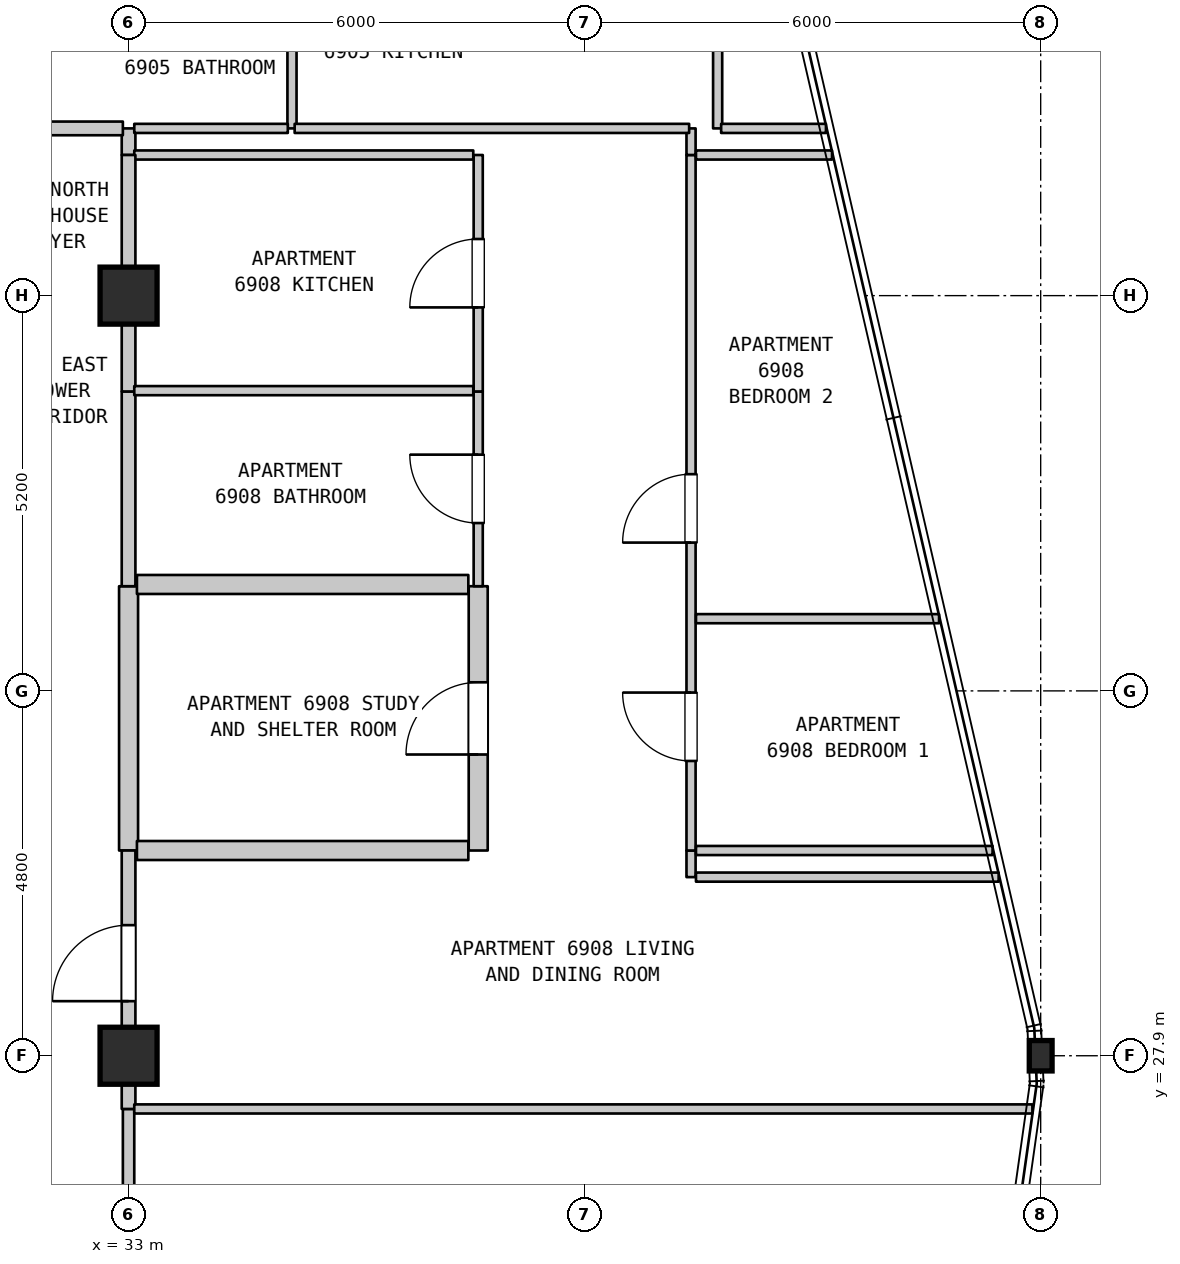
"""IFC4 building model, lengths in metres.
Left out: names, types, materials, properties, quantities, classifications, styles, units other than length and angle.
Written with IfcOpenShell. Run it as: python <this file> out.ifc"""

import sys

from ifc_helpers import new_model, si_unit, direction, frame, frame_2d, origin, origin_2d, place, context, subcontext, project, spatial, rectangle, i_section, extrude, element, fill, save


model = new_model("IFC4")
c1 = context("Model", 3, precision=1e-05, world=origin(), true_north=direction((0.0, 1.0)))
c2 = subcontext(c1, "Body", "Model", "MODEL_VIEW")
j1 = project(units=[si_unit("LENGTHUNIT", "METRE"), si_unit("PLANEANGLEUNIT", "RADIAN")], contexts=[c1])
p1 = place(None, origin())
s1 = spatial("IfcSite", under=j1, at=p1, CompositionType="ELEMENT")
p2 = place(p1, origin())
s2 = spatial("IfcBuilding", under=s1, at=p2, CompositionType="ELEMENT")
p3 = place(p2, frame((0.0, 0.0, 276.9)))
s3 = spatial("IfcBuildingStorey", under=s2, at=p3, CompositionType="ELEMENT", Elevation=276.9)
for number, where, z_axis, x_axis in (
    (1, (33.0, 27.9, 0.0), (0.0, 0.0, 1.0), (1.0, 0.0, 0.0)),
    (2, (33.0, 37.9, 0.0), (0.0, 0.0, 1.0), (1.0, 0.0, 0.0)),
):
    element("IfcColumn", number, at=place(p3, frame(where, z_axis=z_axis, x_axis=x_axis)), inside=s3, PredefinedType="COLUMN", context=c2, shape_type="SweptSolid", body=[
        extrude(rectangle(XDim=0.75, YDim=0.75, at=origin_2d()), origin(), (0.0, 0.0, 1.0), 3.7),
    ])
p4 = place(p3, frame((45.0, 27.9, 0.0), z_axis=(0.0, 0.0, 1.0), x_axis=(1.0, 0.0, 0.0)))
e3 = element("IfcColumn", 3, at=p4, inside=s3, PredefinedType="COLUMN", context=c2, shape_type="SweptSolid", body=[
    extrude(i_section(OverallWidth=0.3, OverallDepth=0.4, WebThickness=0.013, FlangeThickness=0.024, FilletRadius=0.027, at=origin_2d()), origin(), (0.0, 0.0, 1.0), 3.7),
])
p5 = place(p3, frame((33.0, 19.5, 0.0), z_axis=(0.0, 0.0, 1.0), x_axis=(0.0, 1.0, 0.0)))
e4 = element("IfcWall", 4, at=p5, inside=s3, PredefinedType="STANDARD", context=c2, shape_type="SweptSolid", body=[
    extrude(rectangle(XDim=7.7, YDim=0.15, at=frame_2d((3.85, 0.0))), origin(), (0.0, 0.0, 1.0), 3.1),
])
p6 = place(p5, frame((3.913, 0.0, 0.0)))
e5 = element("IfcOpeningElement", 5, at=p6, cuts=e4, PredefinedType="OPENING", context=c2, shape_type="SweptSolid", body=[
    extrude(rectangle(XDim=1.0, YDim=2.15, at=frame_2d((0.5, 1.075))), frame((0.0, 0.085, 0.0), z_axis=(0.0, -1.0, 0.0), x_axis=(1.0, 0.0, 0.0)), (0.0, 0.0, 1.0), 0.17),
])
p7 = place(p3, frame((33.0, 27.2, 0.0), z_axis=(0.0, 0.0, 1.0), x_axis=(0.0, 1.0, 0.0)))
e6 = element("IfcWall", 6, at=p7, inside=s3, PredefinedType="STANDARD", context=c2, shape_type="SweptSolid", body=[
    extrude(rectangle(XDim=0.7, YDim=0.18, at=frame_2d((0.35, 0.0))), origin(), (0.0, 0.0, 1.0), 3.1),
])
p8 = place(p3, frame((33.0, 30.6, 0.0), z_axis=(0.0, 0.0, 1.0), x_axis=(0.0, 1.0, 0.0)))
e7 = element("IfcWall", 7, at=p8, inside=s3, PredefinedType="STANDARD", context=c2, shape_type="SweptSolid", body=[
    extrude(rectangle(XDim=3.477, YDim=0.25, at=frame_2d((1.738, 0.0))), origin(), (0.0, 0.0, 1.0), 2.89),
])
p9 = place(p3, frame((33.0, 34.077, 0.0), z_axis=(0.0, 0.0, 1.0), x_axis=(0.0, 1.0, 0.0)))
e8 = element("IfcWall", 8, at=p9, inside=s3, PredefinedType="STANDARD", context=c2, shape_type="SweptSolid", body=[
    extrude(rectangle(XDim=2.562, YDim=0.18, at=frame_2d((1.281, 0.0))), origin(), (0.0, 0.0, 1.0), 2.89),
])
p10 = place(p3, frame((33.0, 36.639, 0.0), z_axis=(0.0, 0.0, 1.0), x_axis=(0.0, 1.0, 0.0)))
e9 = element("IfcWall", 9, at=p10, inside=s3, PredefinedType="STANDARD", context=c2, shape_type="SweptSolid", body=[
    extrude(rectangle(XDim=1.261, YDim=0.18, at=frame_2d((0.63, 0.0))), origin(), (0.0, 0.0, 1.0), 2.89),
])
p11 = place(p3, frame((33.0, 39.75, 0.0), z_axis=(0.0, 0.0, 1.0), x_axis=(0.0, 1.0, 0.0)))
e10 = element("IfcWall", 10, at=p11, inside=s3, PredefinedType="STANDARD", context=c2, shape_type="SweptSolid", body=[
    extrude(rectangle(XDim=0.35, YDim=0.18, at=frame_2d((0.175, 0.0))), origin(), (0.0, 0.0, 1.0), 3.39),
])
p12 = place(p3, frame((35.15, 40.1, 0.0), z_axis=(0.0, 0.0, 1.0), x_axis=(0.0, 1.0, 0.0)))
e11 = element("IfcWall", 11, at=p12, inside=s3, PredefinedType="PARTITIONING", context=c2, shape_type="SweptSolid", body=[
    extrude(rectangle(XDim=2.3, YDim=0.12, at=frame_2d((1.15, 0.0))), origin(), (0.0, 0.0, 1.0), 3.39),
])
p13 = place(p3, frame((37.6, 30.6, 0.0), z_axis=(0.0, 0.0, 1.0), x_axis=(0.0, 1.0, 0.0)))
e12 = element("IfcWall", 12, at=p13, inside=s3, PredefinedType="STANDARD", context=c2, shape_type="SweptSolid", body=[
    extrude(rectangle(XDim=3.477, YDim=0.25, at=frame_2d((1.738, 0.0))), origin(), (0.0, 0.0, 1.0), 3.39),
])
p14 = place(p13, frame((1.263, 0.0, 0.0)))
e13 = element("IfcOpeningElement", 13, at=p14, cuts=e12, PredefinedType="OPENING", context=c2, shape_type="SweptSolid", body=[
    extrude(rectangle(XDim=0.95, YDim=2.15, at=frame_2d((0.475, 1.075))), frame((0.0, 0.135, 0.0), z_axis=(0.0, -1.0, 0.0), x_axis=(1.0, 0.0, 0.0)), (0.0, 0.0, 1.0), 0.27),
])
p15 = place(p3, frame((37.6, 34.077, 0.0), z_axis=(0.0, 0.0, 1.0), x_axis=(0.0, 1.0, 0.0)))
e14 = element("IfcWall", 14, at=p15, inside=s3, PredefinedType="PARTITIONING", context=c2, shape_type="SweptSolid", body=[
    extrude(rectangle(XDim=2.562, YDim=0.12, at=frame_2d((1.281, 0.0))), origin(), (0.0, 0.0, 1.0), 3.39),
])
p16 = place(p15, frame((0.831, 0.0, 0.0)))
e15 = element("IfcOpeningElement", 15, at=p16, cuts=e14, PredefinedType="OPENING", context=c2, shape_type="SweptSolid", body=[
    extrude(rectangle(XDim=0.9, YDim=2.1, at=frame_2d((0.45, 1.05))), frame((0.0, 0.07, 0.0), z_axis=(0.0, -1.0, 0.0), x_axis=(1.0, 0.0, 0.0)), (0.0, 0.0, 1.0), 0.14),
])
p17 = place(p3, frame((37.6, 36.639, 0.0), z_axis=(0.0, 0.0, 1.0), x_axis=(0.0, 1.0, 0.0)))
e16 = element("IfcWall", 16, at=p17, inside=s3, PredefinedType="PARTITIONING", context=c2, shape_type="SweptSolid", body=[
    extrude(rectangle(XDim=3.111, YDim=0.12, at=frame_2d((1.556, 0.0))), origin(), (0.0, 0.0, 1.0), 3.39),
])
p18 = place(p17, frame((1.106, 0.0, 0.0)))
e17 = element("IfcOpeningElement", 17, at=p18, cuts=e16, PredefinedType="OPENING", context=c2, shape_type="SweptSolid", body=[
    extrude(rectangle(XDim=0.9, YDim=2.15, at=frame_2d((0.45, 1.075))), frame((0.0, 0.07, 0.0), z_axis=(0.0, -1.0, 0.0), x_axis=(1.0, 0.0, 0.0)), (0.0, 0.0, 1.0), 0.14),
])
p19 = place(p3, frame((40.4, 30.25, 0.0), z_axis=(0.0, 0.0, 1.0), x_axis=(0.0, 1.0, 0.0)))
e18 = element("IfcWall", 18, at=p19, inside=s3, PredefinedType="PARTITIONING", context=c2, shape_type="SweptSolid", body=[
    extrude(rectangle(XDim=0.35, YDim=0.12, at=frame_2d((0.175, 0.0))), origin(), (0.0, 0.0, 1.0), 3.39),
])
p20 = place(p3, frame((40.4, 30.6, 0.0), z_axis=(0.0, 0.0, 1.0), x_axis=(0.0, 1.0, 0.0)))
e19 = element("IfcWall", 19, at=p20, inside=s3, PredefinedType="PARTITIONING", context=c2, shape_type="SweptSolid", body=[
    extrude(rectangle(XDim=9.15, YDim=0.12, at=frame_2d((4.575, 0.0))), origin(), (0.0, 0.0, 1.0), 3.39),
])
p21 = place(p20, frame((1.178, 0.0, 0.0)))
e20 = element("IfcOpeningElement", 20, at=p21, cuts=e19, PredefinedType="OPENING", context=c2, shape_type="SweptSolid", body=[
    extrude(rectangle(XDim=0.9, YDim=2.15, at=frame_2d((0.45, 1.075))), frame((0.0, 0.07, 0.0), z_axis=(0.0, -1.0, 0.0), x_axis=(1.0, 0.0, 0.0)), (0.0, 0.0, 1.0), 0.14),
])
p22 = place(p20, frame((4.051, 0.0, 0.0)))
e21 = element("IfcOpeningElement", 21, at=p22, cuts=e19, PredefinedType="OPENING", context=c2, shape_type="SweptSolid", body=[
    extrude(rectangle(XDim=0.9, YDim=2.15, at=frame_2d((0.45, 1.075))), frame((0.0, 0.07, 0.0), z_axis=(0.0, -1.0, 0.0), x_axis=(1.0, 0.0, 0.0)), (0.0, 0.0, 1.0), 0.14),
])
p23 = place(p3, frame((40.4, 39.75, 0.0), z_axis=(0.0, 0.0, 1.0), x_axis=(0.0, 1.0, 0.0)))
e22 = element("IfcWall", 22, at=p23, inside=s3, PredefinedType="PARTITIONING", context=c2, shape_type="SweptSolid", body=[
    extrude(rectangle(XDim=0.35, YDim=0.12, at=frame_2d((0.175, 0.0))), origin(), (0.0, 0.0, 1.0), 3.39),
])
p24 = place(p3, frame((40.75, 40.1, 0.0), z_axis=(0.0, 0.0, 1.0), x_axis=(0.0, 1.0, 0.0)))
e23 = element("IfcWall", 23, at=p24, inside=s3, PredefinedType="PARTITIONING", context=c2, shape_type="SweptSolid", body=[
    extrude(rectangle(XDim=2.3, YDim=0.12, at=frame_2d((1.15, 0.0))), origin(), (0.0, 0.0, 1.0), 3.39),
])
p25 = place(p3, frame((33.075, 27.2, 0.0), z_axis=(0.0, 0.0, 1.0), x_axis=(1.0, 0.0, 0.0)))
e24 = element("IfcWall", 24, at=p25, inside=s3, PredefinedType="PARTITIONING", context=c2, shape_type="SweptSolid", body=[
    extrude(rectangle(XDim=11.816, YDim=0.12, at=frame_2d((5.908, 0.0))), origin(), (0.0, 0.0, 1.0), 3.39),
])
p26 = place(p3, frame((40.465, 30.25, 0.0), z_axis=(0.0, 0.0, 1.0), x_axis=(1.0, 0.0, 0.0)))
e25 = element("IfcWall", 25, at=p26, inside=s3, PredefinedType="PARTITIONING", context=c2, shape_type="SweptSolid", body=[
    extrude(rectangle(XDim=3.982, YDim=0.12, at=frame_2d((1.991, 0.0))), origin(), (0.0, 0.0, 1.0), 3.39),
])
p27 = place(p3, frame((33.11, 30.6, 0.0), z_axis=(0.0, 0.0, 1.0), x_axis=(1.0, 0.0, 0.0)))
e26 = element("IfcWall", 26, at=p27, inside=s3, PredefinedType="STANDARD", context=c2, shape_type="SweptSolid", body=[
    extrude(rectangle(XDim=4.36, YDim=0.25, at=frame_2d((2.18, 0.0))), origin(), (0.0, 0.0, 1.0), 3.39),
])
p28 = place(p3, frame((40.465, 30.6, 0.0), z_axis=(0.0, 0.0, 1.0), x_axis=(1.0, 0.0, 0.0)))
e27 = element("IfcWall", 27, at=p28, inside=s3, PredefinedType="PARTITIONING", context=c2, shape_type="SweptSolid", body=[
    extrude(rectangle(XDim=3.902, YDim=0.12, at=frame_2d((1.951, 0.0))), origin(), (0.0, 0.0, 1.0), 3.39),
])
p29 = place(p3, frame((40.465, 33.65, 0.0), z_axis=(0.0, 0.0, 1.0), x_axis=(1.0, 0.0, 0.0)))
e28 = element("IfcWall", 28, at=p29, inside=s3, PredefinedType="PARTITIONING", context=c2, shape_type="SweptSolid", body=[
    extrude(rectangle(XDim=3.198, YDim=0.12, at=frame_2d((1.599, 0.0))), origin(), (0.0, 0.0, 1.0), 3.39),
])
p30 = place(p3, frame((33.11, 34.1, 0.0), z_axis=(0.0, 0.0, 1.0), x_axis=(1.0, 0.0, 0.0)))
e29 = element("IfcWall", 29, at=p30, inside=s3, PredefinedType="STANDARD", context=c2, shape_type="SweptSolid", body=[
    extrude(rectangle(XDim=4.36, YDim=0.25, at=frame_2d((2.18, 0.0))), origin(), (0.0, 0.0, 1.0), 3.39),
])
for number, where, z_axis, x_axis in (
    (30, (33.075, 36.65, 0.0), (0.0, 0.0, 1.0), (1.0, 0.0, 0.0)),
    (31, (33.075, 39.75, 0.0), (0.0, 0.0, 1.0), (1.0, 0.0, 0.0)),
):
    element("IfcWall", number, at=place(p3, frame(where, z_axis=z_axis, x_axis=x_axis)), inside=s3, PredefinedType="PARTITIONING", context=c2, shape_type="SweptSolid", body=[
        extrude(rectangle(XDim=4.46, YDim=0.12, at=frame_2d((2.23, 0.0))), origin(), (0.0, 0.0, 1.0), 3.39),
    ])
p31 = place(p3, frame((40.465, 39.75, 0.0), z_axis=(0.0, 0.0, 1.0), x_axis=(1.0, 0.0, 0.0)))
e32 = element("IfcWall", 32, at=p31, inside=s3, PredefinedType="PARTITIONING", context=c2, shape_type="SweptSolid", body=[
    extrude(rectangle(XDim=1.79, YDim=0.12, at=frame_2d((0.895, 0.0))), origin(), (0.0, 0.0, 1.0), 3.39),
])
p32 = place(p3, frame((31.05, 40.1, 0.0), z_axis=(0.0, 0.0, 1.0), x_axis=(1.0, 0.0, 0.0)))
e33 = element("IfcWall", 33, at=p32, inside=s3, PredefinedType="STANDARD", context=c2, shape_type="SweptSolid", body=[
    extrude(rectangle(XDim=1.875, YDim=0.18, at=frame_2d((0.938, 0.0))), origin(), (0.0, 0.0, 1.0), 3.39),
])
p33 = place(p3, frame((33.075, 40.1, 0.0), z_axis=(0.0, 0.0, 1.0), x_axis=(1.0, 0.0, 0.0)))
e34 = element("IfcWall", 34, at=p33, inside=s3, PredefinedType="PARTITIONING", context=c2, shape_type="SweptSolid", body=[
    extrude(rectangle(XDim=2.02, YDim=0.12, at=frame_2d((1.01, 0.0))), origin(), (0.0, 0.0, 1.0), 3.39),
])
p34 = place(p3, frame((35.185, 40.1, 0.0), z_axis=(0.0, 0.0, 1.0), x_axis=(1.0, 0.0, 0.0)))
e35 = element("IfcWall", 35, at=p34, inside=s3, PredefinedType="PARTITIONING", context=c2, shape_type="SweptSolid", body=[
    extrude(rectangle(XDim=5.19, YDim=0.12, at=frame_2d((2.595, 0.0))), origin(), (0.0, 0.0, 1.0), 3.39),
])
p35 = place(p3, frame((40.796, 40.1, 0.0), z_axis=(0.0, 0.0, 1.0), x_axis=(1.0, 0.0, 0.0)))
e36 = element("IfcWall", 36, at=p35, inside=s3, PredefinedType="PARTITIONING", context=c2, shape_type="SweptSolid", body=[
    extrude(rectangle(XDim=1.379, YDim=0.12, at=frame_2d((0.689, 0.0))), origin(), (0.0, 0.0, 1.0), 3.39),
])
p36 = place(p3, frame((33.0, 27.9, 0.0), z_axis=(0.0, 0.0, 1.0), x_axis=(0.0, 1.0, 0.0)))
e37 = element("IfcWall", 37, at=p36, inside=s3, PredefinedType="STANDARD", context=c2, shape_type="SweptSolid", body=[
    extrude(rectangle(XDim=2.7, YDim=0.18, at=frame_2d((1.35, 0.0))), origin(), (0.0, 0.0, 1.0), 2.89),
])
p37 = place(p36, frame((0.718, 0.0, 0.0)))
e38 = element("IfcOpeningElement", 38, at=p37, cuts=e37, PredefinedType="OPENING", context=c2, shape_type="SweptSolid", body=[
    extrude(rectangle(XDim=1.0, YDim=2.15, at=frame_2d((0.5, 1.075))), frame((0.0, 0.1, 0.0), z_axis=(0.0, -1.0, 0.0), x_axis=(1.0, 0.0, 0.0)), (0.0, 0.0, 1.0), 0.2),
])
p38 = place(p3, frame((33.0, 37.9, 0.0), z_axis=(0.0, 0.0, 1.0), x_axis=(0.0, 1.0, 0.0)))
e39 = element("IfcWall", 39, at=p38, inside=s3, PredefinedType="STANDARD", context=c2, shape_type="SweptSolid", body=[
    extrude(rectangle(XDim=1.85, YDim=0.18, at=frame_2d((0.925, 0.0))), origin(), (0.0, 0.0, 1.0), 2.79),
])
p39 = place(p37, origin())
e40 = element("IfcDoor", 40, at=p39, inside=s3, OperationType="SINGLE_SWING_LEFT", PredefinedType="DOOR", context=c2, shape_type="SweptSolid", body=[
    extrude(rectangle(XDim=1.0, YDim=2.15, at=frame_2d((0.5, 1.075))), frame((0.0, 0.025, 0.0), z_axis=(0.0, -1.0, 0.0), x_axis=(1.0, 0.0, 0.0)), (0.0, 0.0, 1.0), 0.05),
])
fill(e38, e40)
p40 = place(p14, origin())
e41 = element("IfcDoor", 41, at=p40, inside=s3, OperationType="SINGLE_SWING_LEFT", PredefinedType="DOOR", context=c2, shape_type="SweptSolid", body=[
    extrude(rectangle(XDim=0.95, YDim=2.15, at=frame_2d((0.475, 1.075))), frame((0.0, 0.025, 0.0), z_axis=(0.0, -1.0, 0.0), x_axis=(1.0, 0.0, 0.0)), (0.0, 0.0, 1.0), 0.05),
])
fill(e13, e41)
p41 = place(p16, origin())
e42 = element("IfcDoor", 42, at=p41, inside=s3, OperationType="SINGLE_SWING_RIGHT", PredefinedType="DOOR", context=c2, shape_type="SweptSolid", body=[
    extrude(rectangle(XDim=0.9, YDim=2.1, at=frame_2d((0.45, 1.05))), frame((0.0, 0.025, 0.0), z_axis=(0.0, -1.0, 0.0), x_axis=(1.0, 0.0, 0.0)), (0.0, 0.0, 1.0), 0.05),
])
fill(e15, e42)
p42 = place(p18, origin())
e43 = element("IfcDoor", 43, at=p42, inside=s3, OperationType="SINGLE_SWING_LEFT", PredefinedType="DOOR", context=c2, shape_type="SweptSolid", body=[
    extrude(rectangle(XDim=0.9, YDim=2.15, at=frame_2d((0.45, 1.075))), frame((0.0, 0.025, 0.0), z_axis=(0.0, -1.0, 0.0), x_axis=(1.0, 0.0, 0.0)), (0.0, 0.0, 1.0), 0.05),
])
fill(e17, e43)
p43 = place(p21, origin())
e44 = element("IfcDoor", 44, at=p43, inside=s3, OperationType="SINGLE_SWING_RIGHT", PredefinedType="DOOR", context=c2, shape_type="SweptSolid", body=[
    extrude(rectangle(XDim=0.9, YDim=2.15, at=frame_2d((0.45, 1.075))), frame((0.0, 0.025, 0.0), z_axis=(0.0, -1.0, 0.0), x_axis=(1.0, 0.0, 0.0)), (0.0, 0.0, 1.0), 0.05),
])
fill(e20, e44)
p44 = place(p22, origin())
e45 = element("IfcDoor", 45, at=p44, inside=s3, OperationType="SINGLE_SWING_LEFT", PredefinedType="DOOR", context=c2, shape_type="SweptSolid", body=[
    extrude(rectangle(XDim=0.9, YDim=2.15, at=frame_2d((0.45, 1.075))), frame((0.0, 0.025, 0.0), z_axis=(0.0, -1.0, 0.0), x_axis=(1.0, 0.0, 0.0)), (0.0, 0.0, 1.0), 0.05),
])
fill(e21, e45)
save(model, sys.argv[1])
